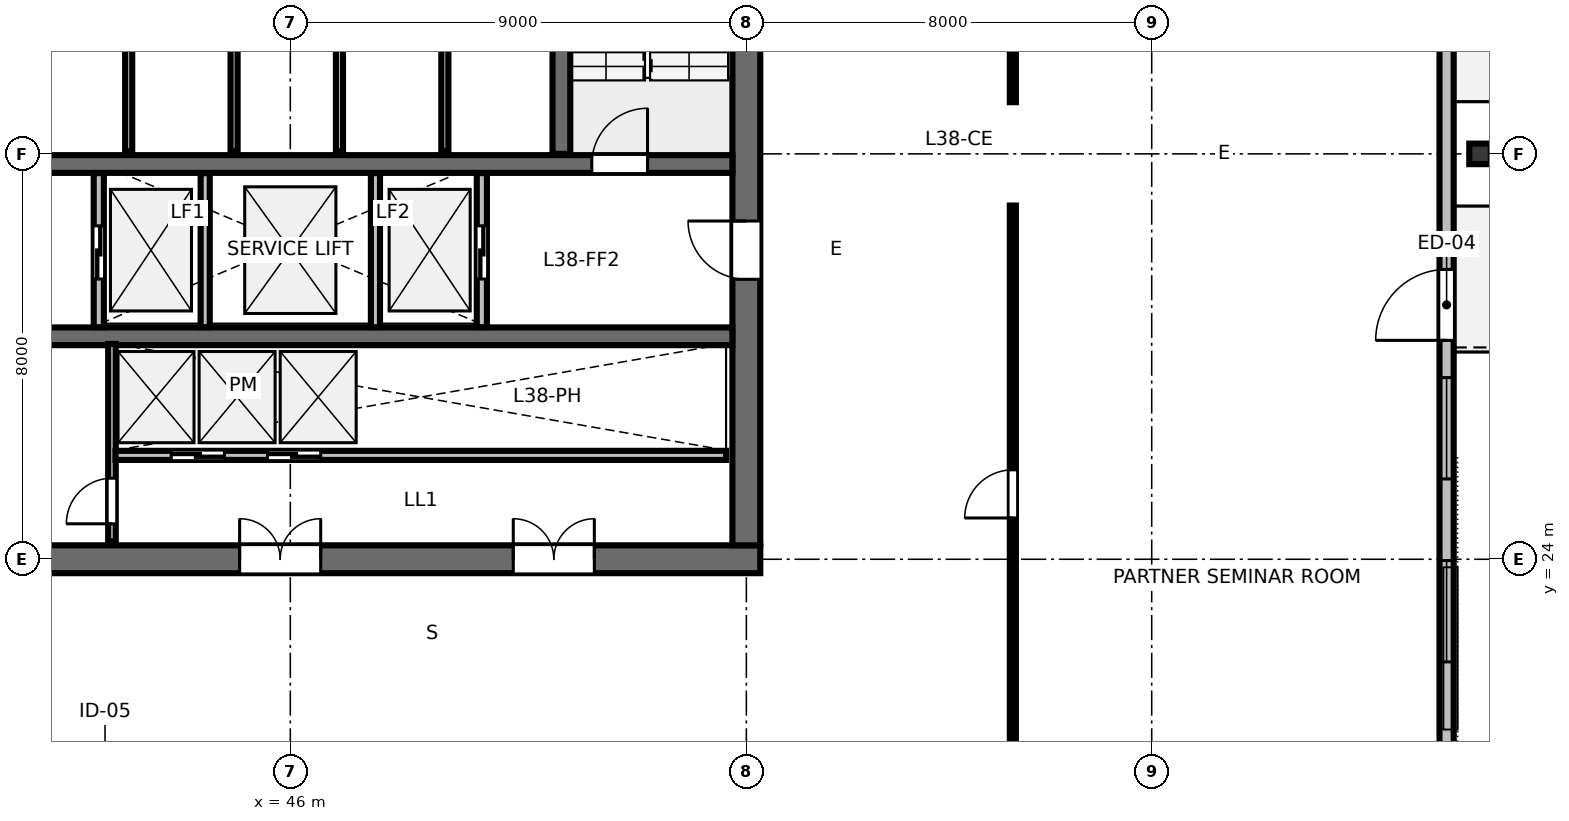
"""IFC4 building model, lengths in metres.
Left out: names, types, materials, properties, quantities, classifications, styles, units other than length and angle.
Written with IfcOpenShell. Run it as: python <this file> out.ifc"""

import sys

from ifc_helpers import new_model, si_unit, direction, frame, frame_2d, origin, origin_2d, place, context, subcontext, project, spatial, rectangle, i_section, extrude, element, fill, save


model = new_model("IFC4")
c1 = context("Model", 3, precision=1e-05, world=origin(), true_north=direction((0.0, 1.0)))
c2 = subcontext(c1, "Body", "Model", "MODEL_VIEW")
j1 = project(units=[si_unit("LENGTHUNIT", "METRE"), si_unit("PLANEANGLEUNIT", "RADIAN")], contexts=[c1])
p1 = place(None, origin())
s1 = spatial("IfcSite", under=j1, at=p1, CompositionType="ELEMENT")
p2 = place(p1, origin())
s2 = spatial("IfcBuilding", under=s1, at=p2, CompositionType="ELEMENT")
p3 = place(p2, frame((0.0, 0.0, 145.6)))
s3 = spatial("IfcBuildingStorey", under=s2, at=p3, CompositionType="ELEMENT", Elevation=145.6)
p4 = place(p3, frame((36.725, 24.0, 0.0), z_axis=(0.0, 0.0, 1.0), x_axis=(1.0, 0.0, 0.0)))
e1 = element("IfcWall", 1, at=p4, inside=s3, PredefinedType="SHEAR", context=c2, shape_type="SweptSolid", body=[
    extrude(rectangle(XDim=18.55, YDim=0.55, at=frame_2d((9.275, 0.0))), origin(), (0.0, 0.0, 1.0), 3.36),
])
p5 = place(p4, frame((8.275, 0.0, 0.0)))
e2 = element("IfcOpeningElement", 2, at=p5, cuts=e1, PredefinedType="OPENING", context=c2, shape_type="SweptSolid", body=[
    extrude(rectangle(XDim=1.6, YDim=2.15, at=frame_2d((0.8, 1.075))), frame((0.0, 0.285, 0.0), z_axis=(0.0, -1.0, 0.0), x_axis=(1.0, 0.0, 0.0)), (0.0, 0.0, 1.0), 0.57),
])
p6 = place(p4, frame((13.675, 0.0, 0.0)))
e3 = element("IfcOpeningElement", 3, at=p6, cuts=e1, PredefinedType="OPENING", context=c2, shape_type="SweptSolid", body=[
    extrude(rectangle(XDim=1.6, YDim=2.15, at=frame_2d((0.8, 1.075))), frame((0.0, 0.285, 0.0), z_axis=(0.0, -1.0, 0.0), x_axis=(1.0, 0.0, 0.0)), (0.0, 0.0, 1.0), 0.57),
])
p7 = place(p3, frame((55.0, 24.275, 0.0), z_axis=(0.0, 0.0, 1.0), x_axis=(0.0, 1.0, 0.0)))
e4 = element("IfcWall", 4, at=p7, inside=s3, PredefinedType="SHEAR", context=c2, shape_type="SweptSolid", body=[
    extrude(rectangle(XDim=15.45, YDim=0.55, at=frame_2d((7.725, 0.0))), origin(), (0.0, 0.0, 1.0), 3.36),
])
p8 = place(p7, frame((5.25, 0.0, 0.0)))
e5 = element("IfcOpeningElement", 5, at=p8, cuts=e4, PredefinedType="OPENING", context=c2, shape_type="SweptSolid", body=[
    extrude(rectangle(XDim=1.15, YDim=2.15, at=frame_2d((0.575, 1.075))), frame((0.0, 0.285, 0.0), z_axis=(0.0, -1.0, 0.0), x_axis=(1.0, 0.0, 0.0)), (0.0, 0.0, 1.0), 0.57),
])
p9 = place(p3, frame((37.275, 31.8, 0.0), z_axis=(0.0, 0.0, 1.0), x_axis=(1.0, 0.0, 0.0)))
e6 = element("IfcWall", 6, at=p9, inside=s3, PredefinedType="SHEAR", context=c2, shape_type="SweptSolid", body=[
    extrude(rectangle(XDim=17.45, YDim=0.35, at=frame_2d((8.725, 0.0))), origin(), (0.0, 0.0, 1.0), 3.36),
])
p10 = place(p9, frame((0.775, 0.0, 0.0)))
e7 = element("IfcOpeningElement", 7, at=p10, cuts=e6, PredefinedType="OPENING", context=c2, shape_type="SweptSolid", body=[
    extrude(rectangle(XDim=1.1, YDim=2.15, at=frame_2d((0.55, 1.075))), frame((0.0, 0.185, 0.0), z_axis=(0.0, -1.0, 0.0), x_axis=(1.0, 0.0, 0.0)), (0.0, 0.0, 1.0), 0.37),
])
p11 = place(p9, frame((14.675, 0.0, 0.0)))
e8 = element("IfcOpeningElement", 8, at=p11, cuts=e6, PredefinedType="OPENING", context=c2, shape_type="SweptSolid", body=[
    extrude(rectangle(XDim=1.1, YDim=2.15, at=frame_2d((0.55, 1.075))), frame((0.0, 0.185, 0.0), z_axis=(0.0, -1.0, 0.0), x_axis=(1.0, 0.0, 0.0)), (0.0, 0.0, 1.0), 0.37),
])
p12 = place(p3, frame((37.275, 28.4, 0.0), z_axis=(0.0, 0.0, 1.0), x_axis=(1.0, 0.0, 0.0)))
e9 = element("IfcWall", 9, at=p12, inside=s3, PredefinedType="SHEAR", context=c2, shape_type="SweptSolid", body=[
    extrude(rectangle(XDim=17.45, YDim=0.35, at=frame_2d((8.725, 0.0))), origin(), (0.0, 0.0, 1.0), 3.36),
])
p13 = place(p3, frame((69.48, 32.0, 0.0), z_axis=(0.089001216718, 0.0, 0.996031517284), x_axis=(-0.996031517284, 0.0, 0.089001216718)))
e10 = element("IfcColumn", 10, at=p13, inside=s3, PredefinedType="COLUMN", context=c2, shape_type="SweptSolid", body=[
    extrude(i_section(OverallWidth=0.406, OverallDepth=0.425, WebThickness=0.033, FlangeThickness=0.052, FilletRadius=0.025, at=origin_2d()), origin(), (0.0, 0.0, 1.0), 3.371),
])
p14 = place(p3, frame((68.82, 16.46, 0.0), z_axis=(0.0, 0.0, 1.0), x_axis=(0.0, 1.0, 0.0)))
e11 = element("IfcWall", 11, at=p14, inside=s3, PredefinedType="STANDARD", context=c2, shape_type="SweptSolid", body=[
    extrude(rectangle(XDim=31.08, YDim=0.28, at=frame_2d((15.54, 0.0))), origin(), (0.0, 0.0, 1.0), 3.36),
])
p15 = place(p14, frame((11.86, 0.0, 0.0)))
e12 = element("IfcOpeningElement", 12, at=p15, cuts=e11, PredefinedType="OPENING", context=c2, shape_type="SweptSolid", body=[
    extrude(rectangle(XDim=1.4, YDim=2.15, at=frame_2d((0.7, 1.075))), frame((0.0, 0.15, 0.0), z_axis=(0.0, -1.0, 0.0), x_axis=(1.0, 0.0, 0.0)), (0.0, 0.0, 1.0), 0.3),
])
p16 = place(p14, frame((5.515, 0.0, 0.8)))
e13 = element("IfcOpeningElement", 13, at=p16, cuts=e11, PredefinedType="OPENING", context=c2, shape_type="SweptSolid", body=[
    extrude(rectangle(XDim=2.0, YDim=1.95, at=frame_2d((1.0, 0.975))), frame((0.0, 0.15, 0.0), z_axis=(0.0, -1.0, 0.0), x_axis=(1.0, 0.0, 0.0)), (0.0, 0.0, 1.0), 0.3),
])
p17 = place(p14, frame((9.125, 0.0, 0.8)))
e14 = element("IfcOpeningElement", 14, at=p17, cuts=e11, PredefinedType="OPENING", context=c2, shape_type="SweptSolid", body=[
    extrude(rectangle(XDim=2.0, YDim=1.95, at=frame_2d((1.0, 0.975))), frame((0.0, 0.15, 0.0), z_axis=(0.0, -1.0, 0.0), x_axis=(1.0, 0.0, 0.0)), (0.0, 0.0, 1.0), 0.3),
])
p18 = place(p14, frame((19.955, 0.0, 0.8)))
e15 = element("IfcOpeningElement", 15, at=p18, cuts=e11, PredefinedType="OPENING", context=c2, shape_type="SweptSolid", body=[
    extrude(rectangle(XDim=2.0, YDim=1.95, at=frame_2d((1.0, 0.975))), frame((0.0, 0.15, 0.0), z_axis=(0.0, -1.0, 0.0), x_axis=(1.0, 0.0, 0.0)), (0.0, 0.0, 1.0), 0.3),
])
p19 = place(p14, frame((23.565, 0.0, 0.8)))
e16 = element("IfcOpeningElement", 16, at=p19, cuts=e11, PredefinedType="OPENING", context=c2, shape_type="SweptSolid", body=[
    extrude(rectangle(XDim=2.0, YDim=1.95, at=frame_2d((1.0, 0.975))), frame((0.0, 0.15, 0.0), z_axis=(0.0, -1.0, 0.0), x_axis=(1.0, 0.0, 0.0)), (0.0, 0.0, 1.0), 0.3),
])
p20 = place(p3, frame((51.35, 32.0, 0.0), z_axis=(0.0, 0.0, 1.0), x_axis=(0.0, 1.0, 0.0)))
e17 = element("IfcWall", 17, at=p20, inside=s3, PredefinedType="SHEAR", context=c2, shape_type="SweptSolid", body=[
    extrude(rectangle(XDim=7.7, YDim=0.35, at=frame_2d((3.85, 0.0))), origin(), (0.0, 0.0, 1.0), 3.6),
])
for number, where, z_axis, x_axis in (
    (18, (42.81, 32.05, 0.0), (0.0, 0.0, 1.0), (0.0, 1.0, 0.0)),
    (19, (44.89, 32.05, 0.0), (0.0, 0.0, 1.0), (0.0, 1.0, 0.0)),
    (20, (46.97, 32.05, 0.0), (0.0, 0.0, 1.0), (0.0, 1.0, 0.0)),
    (21, (49.05, 32.05, 0.0), (0.0, 0.0, 1.0), (0.0, 1.0, 0.0)),
):
    element("IfcWall", number, at=place(p3, frame(where, z_axis=z_axis, x_axis=x_axis)), inside=s3, PredefinedType="PARTITIONING", context=c2, shape_type="SweptSolid", body=[
        extrude(rectangle(XDim=5.5, YDim=0.14, at=frame_2d((2.75, 0.0))), origin(), (0.0, 0.0, 1.0), 3.36),
    ])
p21 = place(p3, frame((42.22, 28.58, 0.0), z_axis=(0.0, 0.0, 1.0), x_axis=(0.0, 1.0, 0.0)))
e22 = element("IfcWall", 22, at=p21, inside=s3, PredefinedType="PARTITIONING", context=c2, shape_type="SweptSolid", body=[
    extrude(rectangle(XDim=3.04, YDim=0.2, at=frame_2d((1.52, 0.0))), origin(), (0.0, 0.0, 1.0), 3.36),
])
p22 = place(p21, frame((0.95, 0.0, 0.0)))
e23 = element("IfcOpeningElement", 23, at=p22, cuts=e22, PredefinedType="OPENING", context=c2, shape_type="SweptSolid", body=[
    extrude(rectangle(XDim=1.05, YDim=2.15, at=frame_2d((0.525, 1.075))), frame((0.0, 0.11, 0.0), z_axis=(0.0, -1.0, 0.0), x_axis=(1.0, 0.0, 0.0)), (0.0, 0.0, 1.0), 0.22),
])
p23 = place(p3, frame((49.78, 28.58, 0.0), z_axis=(0.0, 0.0, 1.0), x_axis=(0.0, 1.0, 0.0)))
e24 = element("IfcWall", 24, at=p23, inside=s3, PredefinedType="PARTITIONING", context=c2, shape_type="SweptSolid", body=[
    extrude(rectangle(XDim=3.04, YDim=0.2, at=frame_2d((1.52, 0.0))), origin(), (0.0, 0.0, 1.0), 3.36),
])
p24 = place(p23, frame((0.95, 0.0, 0.0)))
e25 = element("IfcOpeningElement", 25, at=p24, cuts=e24, PredefinedType="OPENING", context=c2, shape_type="SweptSolid", body=[
    extrude(rectangle(XDim=1.05, YDim=2.15, at=frame_2d((0.525, 1.075))), frame((0.0, 0.11, 0.0), z_axis=(0.0, -1.0, 0.0), x_axis=(1.0, 0.0, 0.0)), (0.0, 0.0, 1.0), 0.22),
])
for number, where, z_axis, x_axis in (
    (26, (44.32, 28.58, 0.0), (0.0, 0.0, 1.0), (0.0, 1.0, 0.0)),
    (27, (47.68, 28.58, 0.0), (0.0, 0.0, 1.0), (0.0, 1.0, 0.0)),
):
    element("IfcWall", number, at=place(p3, frame(where, z_axis=z_axis, x_axis=x_axis)), inside=s3, PredefinedType="PARTITIONING", context=c2, shape_type="SweptSolid", body=[
        extrude(rectangle(XDim=3.04, YDim=0.18, at=frame_2d((1.52, 0.0))), origin(), (0.0, 0.0, 1.0), 3.36),
    ])
p25 = place(p3, frame((42.48, 24.35, 0.0), z_axis=(0.0, 0.0, 1.0), x_axis=(0.0, 1.0, 0.0)))
e28 = element("IfcWall", 28, at=p25, inside=s3, PredefinedType="PARTITIONING", context=c2, shape_type="SweptSolid", body=[
    extrude(rectangle(XDim=3.9, YDim=0.15, at=frame_2d((1.95, 0.0))), origin(), (0.0, 0.0, 1.0), 3.36),
])
p26 = place(p25, frame((0.35, 0.0, 0.0)))
e29 = element("IfcOpeningElement", 29, at=p26, cuts=e28, PredefinedType="OPENING", context=c2, shape_type="SweptSolid", body=[
    extrude(rectangle(XDim=0.9, YDim=2.15, at=frame_2d((0.45, 1.075))), frame((0.0, 0.085, 0.0), z_axis=(0.0, -1.0, 0.0), x_axis=(1.0, 0.0, 0.0)), (0.0, 0.0, 1.0), 0.17),
])
p27 = place(p3, frame((42.55, 26.05, 0.0), z_axis=(0.0, 0.0, 1.0), x_axis=(1.0, 0.0, 0.0)))
e30 = element("IfcWall", 30, at=p27, inside=s3, PredefinedType="PARTITIONING", context=c2, shape_type="SweptSolid", body=[
    extrude(rectangle(XDim=12.05, YDim=0.18, at=frame_2d((6.025, 0.0))), origin(), (0.0, 0.0, 1.0), 3.36),
])
p28 = place(p27, frame((1.1, 0.0, 0.0)))
e31 = element("IfcOpeningElement", 31, at=p28, cuts=e30, PredefinedType="OPENING", context=c2, shape_type="SweptSolid", body=[
    extrude(rectangle(XDim=1.05, YDim=2.15, at=frame_2d((0.525, 1.075))), frame((0.0, 0.1, 0.0), z_axis=(0.0, -1.0, 0.0), x_axis=(1.0, 0.0, 0.0)), (0.0, 0.0, 1.0), 0.2),
])
p29 = place(p27, frame((3.0, 0.0, 0.0)))
e32 = element("IfcOpeningElement", 32, at=p29, cuts=e30, PredefinedType="OPENING", context=c2, shape_type="SweptSolid", body=[
    extrude(rectangle(XDim=1.05, YDim=2.15, at=frame_2d((0.525, 1.075))), frame((0.0, 0.1, 0.0), z_axis=(0.0, -1.0, 0.0), x_axis=(1.0, 0.0, 0.0)), (0.0, 0.0, 1.0), 0.2),
])
p30 = place(p3, frame((60.26, 19.4, 0.0), z_axis=(0.0, 0.0, 1.0), x_axis=(0.0, 1.0, 0.0)))
e33 = element("IfcWall", 33, at=p30, inside=s3, PredefinedType="PARTITIONING", context=c2, shape_type="SweptSolid", body=[
    extrude(rectangle(XDim=11.58, YDim=0.12, at=frame_2d((5.79, 0.0))), origin(), (0.0, 0.0, 1.0), 2.64),
])
p31 = place(p30, frame((5.415, 0.0, 0.0)))
e34 = element("IfcOpeningElement", 34, at=p31, cuts=e33, PredefinedType="OPENING", context=c2, shape_type="SweptSolid", body=[
    extrude(rectangle(XDim=0.95, YDim=2.15, at=frame_2d((0.475, 1.075))), frame((0.0, 0.07, 0.0), z_axis=(0.0, -1.0, 0.0), x_axis=(1.0, 0.0, 0.0)), (0.0, 0.0, 1.0), 0.14),
])
p32 = place(p3, frame((60.26, 33.02, 0.0), z_axis=(0.0, 0.0, 1.0), x_axis=(0.0, 1.0, 0.0)))
e35 = element("IfcWall", 35, at=p32, inside=s3, PredefinedType="PARTITIONING", context=c2, shape_type="SweptSolid", body=[
    extrude(rectangle(XDim=11.58, YDim=0.12, at=frame_2d((5.79, 0.0))), origin(), (0.0, 0.0, 1.0), 2.64),
])
p33 = place(p32, frame((5.775, 0.0, 0.0)))
e36 = element("IfcOpeningElement", 36, at=p33, cuts=e35, PredefinedType="OPENING", context=c2, shape_type="SweptSolid", body=[
    extrude(rectangle(XDim=0.95, YDim=2.15, at=frame_2d((0.475, 1.075))), frame((0.0, 0.07, 0.0), z_axis=(0.0, -1.0, 0.0), x_axis=(1.0, 0.0, 0.0)), (0.0, 0.0, 1.0), 0.14),
])
p34 = place(p15, origin())
e37 = element("IfcDoor", 37, at=p34, inside=s3, OperationType="SINGLE_SWING_LEFT", PredefinedType="DOOR", context=c2, shape_type="SweptSolid", body=[
    extrude(rectangle(XDim=1.4, YDim=2.15, at=frame_2d((0.7, 1.075))), frame((0.0, 0.025, 0.0), z_axis=(0.0, -1.0, 0.0), x_axis=(1.0, 0.0, 0.0)), (0.0, 0.0, 1.0), 0.05),
])
fill(e12, e37)
p35 = place(p16, origin())
e38 = element("IfcWindow", 38, at=p35, inside=s3, PartitioningType="SINGLE_PANEL", PredefinedType="WINDOW", context=c2, shape_type="SweptSolid", body=[
    extrude(rectangle(XDim=2.0, YDim=1.95, at=frame_2d((1.0, 0.975))), frame((0.0, 0.03, 0.0), z_axis=(0.0, -1.0, 0.0), x_axis=(1.0, 0.0, 0.0)), (0.0, 0.0, 1.0), 0.06),
])
fill(e13, e38)
p36 = place(p17, origin())
e39 = element("IfcWindow", 39, at=p36, inside=s3, PartitioningType="SINGLE_PANEL", PredefinedType="WINDOW", context=c2, shape_type="SweptSolid", body=[
    extrude(rectangle(XDim=2.0, YDim=1.95, at=frame_2d((1.0, 0.975))), frame((0.0, 0.03, 0.0), z_axis=(0.0, -1.0, 0.0), x_axis=(1.0, 0.0, 0.0)), (0.0, 0.0, 1.0), 0.06),
])
fill(e14, e39)
p37 = place(p11, origin())
e40 = element("IfcDoor", 40, at=p37, inside=s3, OperationType="SINGLE_SWING_RIGHT", PredefinedType="DOOR", context=c2, shape_type="SweptSolid", body=[
    extrude(rectangle(XDim=1.1, YDim=2.15, at=frame_2d((0.55, 1.075))), frame((0.0, 0.025, 0.0), z_axis=(0.0, -1.0, 0.0), x_axis=(1.0, 0.0, 0.0)), (0.0, 0.0, 1.0), 0.05),
])
fill(e8, e40)
p38 = place(p8, origin())
e41 = element("IfcDoor", 41, at=p38, inside=s3, OperationType="SINGLE_SWING_RIGHT", PredefinedType="DOOR", context=c2, shape_type="SweptSolid", body=[
    extrude(rectangle(XDim=1.15, YDim=2.15, at=frame_2d((0.575, 1.075))), frame((0.0, 0.025, 0.0), z_axis=(0.0, -1.0, 0.0), x_axis=(1.0, 0.0, 0.0)), (0.0, 0.0, 1.0), 0.05),
])
fill(e5, e41)
p39 = place(p5, origin())
e42 = element("IfcDoor", 42, at=p39, inside=s3, OperationType="DOUBLE_DOOR_SINGLE_SWING", PredefinedType="DOOR", context=c2, shape_type="SweptSolid", body=[
    extrude(rectangle(XDim=1.6, YDim=2.15, at=frame_2d((0.8, 1.075))), frame((0.0, 0.025, 0.0), z_axis=(0.0, -1.0, 0.0), x_axis=(1.0, 0.0, 0.0)), (0.0, 0.0, 1.0), 0.05),
])
fill(e2, e42)
p40 = place(p6, origin())
e43 = element("IfcDoor", 43, at=p40, inside=s3, OperationType="DOUBLE_DOOR_SINGLE_SWING", PredefinedType="DOOR", context=c2, shape_type="SweptSolid", body=[
    extrude(rectangle(XDim=1.6, YDim=2.15, at=frame_2d((0.8, 1.075))), frame((0.0, 0.025, 0.0), z_axis=(0.0, -1.0, 0.0), x_axis=(1.0, 0.0, 0.0)), (0.0, 0.0, 1.0), 0.05),
])
fill(e3, e43)
p41 = place(p22, origin())
e44 = element("IfcDoor", 44, at=p41, inside=s3, OperationType="SLIDING_TO_LEFT", PredefinedType="DOOR", context=c2, shape_type="SweptSolid", body=[
    extrude(rectangle(XDim=1.05, YDim=2.15, at=frame_2d((0.525, 1.075))), frame((0.0, 0.025, 0.0), z_axis=(0.0, -1.0, 0.0), x_axis=(1.0, 0.0, 0.0)), (0.0, 0.0, 1.0), 0.05),
])
fill(e23, e44)
p42 = place(p24, origin())
e45 = element("IfcDoor", 45, at=p42, inside=s3, OperationType="SLIDING_TO_RIGHT", PredefinedType="DOOR", context=c2, shape_type="SweptSolid", body=[
    extrude(rectangle(XDim=1.05, YDim=2.15, at=frame_2d((0.525, 1.075))), frame((0.0, 0.025, 0.0), z_axis=(0.0, -1.0, 0.0), x_axis=(1.0, 0.0, 0.0)), (0.0, 0.0, 1.0), 0.05),
])
fill(e25, e45)
p43 = place(p26, origin())
e46 = element("IfcDoor", 46, at=p43, inside=s3, OperationType="SINGLE_SWING_LEFT", PredefinedType="DOOR", context=c2, shape_type="SweptSolid", body=[
    extrude(rectangle(XDim=0.9, YDim=2.15, at=frame_2d((0.45, 1.075))), frame((0.0, 0.025, 0.0), z_axis=(0.0, -1.0, 0.0), x_axis=(1.0, 0.0, 0.0)), (0.0, 0.0, 1.0), 0.05),
])
fill(e29, e46)
p44 = place(p28, origin())
e47 = element("IfcDoor", 47, at=p44, inside=s3, OperationType="SLIDING_TO_LEFT", PredefinedType="DOOR", context=c2, shape_type="SweptSolid", body=[
    extrude(rectangle(XDim=1.05, YDim=2.15, at=frame_2d((0.525, 1.075))), frame((0.0, 0.025, 0.0), z_axis=(0.0, -1.0, 0.0), x_axis=(1.0, 0.0, 0.0)), (0.0, 0.0, 1.0), 0.05),
])
fill(e31, e47)
p45 = place(p29, origin())
e48 = element("IfcDoor", 48, at=p45, inside=s3, OperationType="SLIDING_TO_RIGHT", PredefinedType="DOOR", context=c2, shape_type="SweptSolid", body=[
    extrude(rectangle(XDim=1.05, YDim=2.15, at=frame_2d((0.525, 1.075))), frame((0.0, 0.025, 0.0), z_axis=(0.0, -1.0, 0.0), x_axis=(1.0, 0.0, 0.0)), (0.0, 0.0, 1.0), 0.05),
])
fill(e32, e48)
p46 = place(p31, origin())
e49 = element("IfcDoor", 49, at=p46, inside=s3, OperationType="SINGLE_SWING_LEFT", PredefinedType="DOOR", context=c2, shape_type="SweptSolid", body=[
    extrude(rectangle(XDim=0.95, YDim=2.15, at=frame_2d((0.475, 1.075))), frame((0.0, 0.025, 0.0), z_axis=(0.0, -1.0, 0.0), x_axis=(1.0, 0.0, 0.0)), (0.0, 0.0, 1.0), 0.05),
])
fill(e34, e49)
save(model, sys.argv[1])
